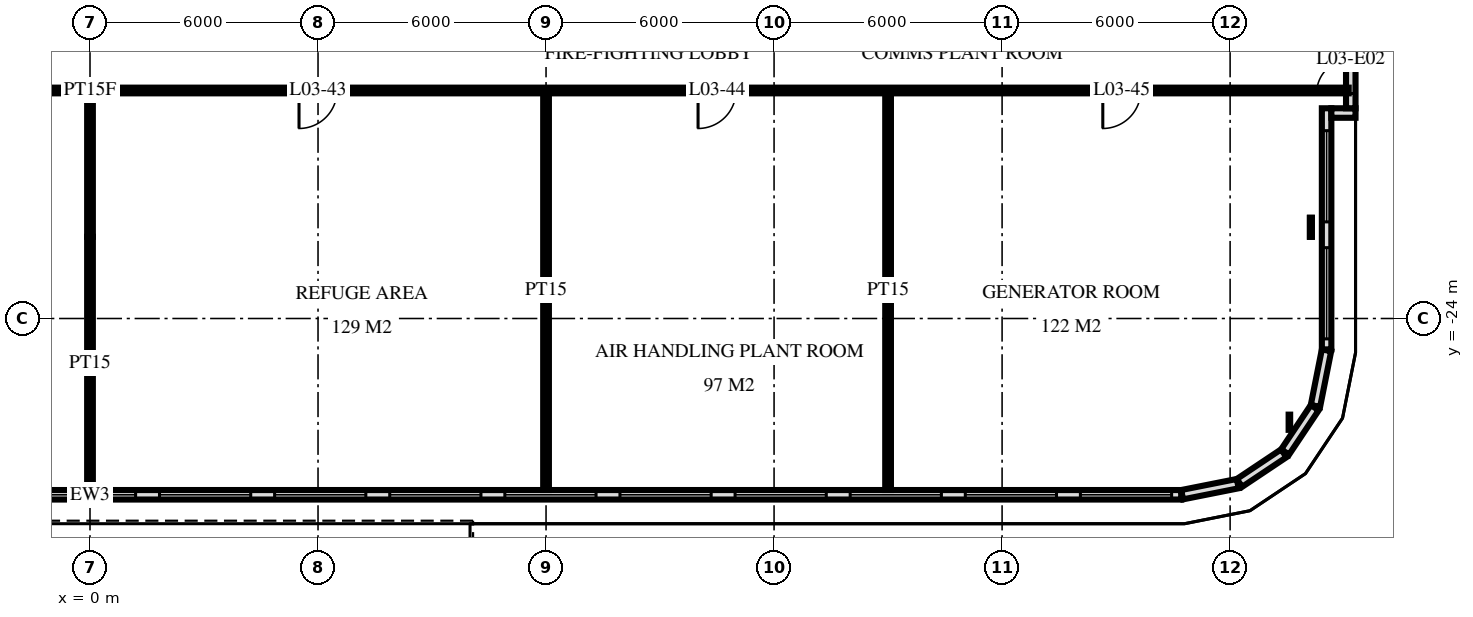
"""IFC4 building model, lengths in metres.
Left out: names, types, materials, properties, quantities, classifications, styles, units other than length and angle.
Written with IfcOpenShell. Run it as: python <this file> out.ifc"""

import sys

from ifc_helpers import new_model, si_unit, direction, frame, frame_2d, origin, place, context, subcontext, project, spatial, rectangle, extrude, element, fill, save


model = new_model("IFC4")
c1 = context("Model", 3, precision=1e-05, world=origin(), true_north=direction((0.0, 1.0)))
c2 = subcontext(c1, "Body", "Model", "MODEL_VIEW")
j1 = project(units=[si_unit("LENGTHUNIT", "METRE"), si_unit("PLANEANGLEUNIT", "RADIAN")], contexts=[c1])
p1 = place(None, origin())
s1 = spatial("IfcSite", under=j1, at=p1, CompositionType="ELEMENT")
p2 = place(p1, origin())
s2 = spatial("IfcBuilding", under=s1, at=p2, CompositionType="ELEMENT")
p3 = place(p2, frame((0.0, 0.0, 18.0)))
s3 = spatial("IfcBuildingStorey", under=s2, at=p3, CompositionType="ELEMENT", Elevation=18.0)
p4 = place(p3, frame((-28.713, -28.639, 0.0), z_axis=(0.0, 0.0, 1.0), x_axis=(1.0, 0.0, 0.0)))
e1 = element("IfcWall", 1, at=p4, inside=s3, PredefinedType="SOLIDWALL", context=c2, shape_type="SweptSolid", body=[
    extrude(rectangle(XDim=57.426, YDim=0.25, at=frame_2d((28.713, 0.0))), origin(), (0.0, 0.0, 1.0), 5.72),
])
p5 = place(p4, frame((0.252, 0.0, 0.858)))
e2 = element("IfcOpeningElement", 2, at=p5, cuts=e1, PredefinedType="OPENING", context=c2, shape_type="SweptSolid", body=[
    extrude(rectangle(XDim=2.4, YDim=3.6, at=frame_2d((1.2, 1.8))), frame((0.0, 0.135, 0.0), z_axis=(0.0, -1.0, 0.0), x_axis=(1.0, 0.0, 0.0)), (0.0, 0.0, 1.0), 0.27),
])
p6 = place(p4, frame((3.281, 0.0, 0.858)))
e3 = element("IfcOpeningElement", 3, at=p6, cuts=e1, PredefinedType="OPENING", context=c2, shape_type="SweptSolid", body=[
    extrude(rectangle(XDim=2.4, YDim=3.6, at=frame_2d((1.2, 1.8))), frame((0.0, 0.135, 0.0), z_axis=(0.0, -1.0, 0.0), x_axis=(1.0, 0.0, 0.0)), (0.0, 0.0, 1.0), 0.27),
])
p7 = place(p4, frame((6.31, 0.0, 0.858)))
e4 = element("IfcOpeningElement", 4, at=p7, cuts=e1, PredefinedType="OPENING", context=c2, shape_type="SweptSolid", body=[
    extrude(rectangle(XDim=2.4, YDim=3.6, at=frame_2d((1.2, 1.8))), frame((0.0, 0.135, 0.0), z_axis=(0.0, -1.0, 0.0), x_axis=(1.0, 0.0, 0.0)), (0.0, 0.0, 1.0), 0.27),
])
p8 = place(p4, frame((9.339, 0.0, 0.858)))
e5 = element("IfcOpeningElement", 5, at=p8, cuts=e1, PredefinedType="OPENING", context=c2, shape_type="SweptSolid", body=[
    extrude(rectangle(XDim=2.4, YDim=3.6, at=frame_2d((1.2, 1.8))), frame((0.0, 0.135, 0.0), z_axis=(0.0, -1.0, 0.0), x_axis=(1.0, 0.0, 0.0)), (0.0, 0.0, 1.0), 0.27),
])
p9 = place(p4, frame((12.368, 0.0, 0.858)))
e6 = element("IfcOpeningElement", 6, at=p9, cuts=e1, PredefinedType="OPENING", context=c2, shape_type="SweptSolid", body=[
    extrude(rectangle(XDim=2.4, YDim=3.6, at=frame_2d((1.2, 1.8))), frame((0.0, 0.135, 0.0), z_axis=(0.0, -1.0, 0.0), x_axis=(1.0, 0.0, 0.0)), (0.0, 0.0, 1.0), 0.27),
])
p10 = place(p4, frame((15.397, 0.0, 0.858)))
e7 = element("IfcOpeningElement", 7, at=p10, cuts=e1, PredefinedType="OPENING", context=c2, shape_type="SweptSolid", body=[
    extrude(rectangle(XDim=2.4, YDim=3.6, at=frame_2d((1.2, 1.8))), frame((0.0, 0.135, 0.0), z_axis=(0.0, -1.0, 0.0), x_axis=(1.0, 0.0, 0.0)), (0.0, 0.0, 1.0), 0.27),
])
p11 = place(p4, frame((18.426, 0.0, 0.858)))
e8 = element("IfcOpeningElement", 8, at=p11, cuts=e1, PredefinedType="OPENING", context=c2, shape_type="SweptSolid", body=[
    extrude(rectangle(XDim=2.4, YDim=3.6, at=frame_2d((1.2, 1.8))), frame((0.0, 0.135, 0.0), z_axis=(0.0, -1.0, 0.0), x_axis=(1.0, 0.0, 0.0)), (0.0, 0.0, 1.0), 0.27),
])
p12 = place(p4, frame((21.455, 0.0, 0.858)))
e9 = element("IfcOpeningElement", 9, at=p12, cuts=e1, PredefinedType="OPENING", context=c2, shape_type="SweptSolid", body=[
    extrude(rectangle(XDim=2.4, YDim=3.6, at=frame_2d((1.2, 1.8))), frame((0.0, 0.135, 0.0), z_axis=(0.0, -1.0, 0.0), x_axis=(1.0, 0.0, 0.0)), (0.0, 0.0, 1.0), 0.27),
])
p13 = place(p4, frame((24.484, 0.0, 0.858)))
e10 = element("IfcOpeningElement", 10, at=p13, cuts=e1, PredefinedType="OPENING", context=c2, shape_type="SweptSolid", body=[
    extrude(rectangle(XDim=2.4, YDim=3.6, at=frame_2d((1.2, 1.8))), frame((0.0, 0.135, 0.0), z_axis=(0.0, -1.0, 0.0), x_axis=(1.0, 0.0, 0.0)), (0.0, 0.0, 1.0), 0.27),
])
p14 = place(p4, frame((27.513, 0.0, 0.858)))
e11 = element("IfcOpeningElement", 11, at=p14, cuts=e1, PredefinedType="OPENING", context=c2, shape_type="SweptSolid", body=[
    extrude(rectangle(XDim=2.4, YDim=3.6, at=frame_2d((1.2, 1.8))), frame((0.0, 0.135, 0.0), z_axis=(0.0, -1.0, 0.0), x_axis=(1.0, 0.0, 0.0)), (0.0, 0.0, 1.0), 0.27),
])
p15 = place(p4, frame((30.542, 0.0, 0.858)))
e12 = element("IfcOpeningElement", 12, at=p15, cuts=e1, PredefinedType="OPENING", context=c2, shape_type="SweptSolid", body=[
    extrude(rectangle(XDim=2.4, YDim=3.6, at=frame_2d((1.2, 1.8))), frame((0.0, 0.135, 0.0), z_axis=(0.0, -1.0, 0.0), x_axis=(1.0, 0.0, 0.0)), (0.0, 0.0, 1.0), 0.27),
])
p16 = place(p4, frame((33.571, 0.0, 0.858)))
e13 = element("IfcOpeningElement", 13, at=p16, cuts=e1, PredefinedType="OPENING", context=c2, shape_type="SweptSolid", body=[
    extrude(rectangle(XDim=2.4, YDim=3.6, at=frame_2d((1.2, 1.8))), frame((0.0, 0.135, 0.0), z_axis=(0.0, -1.0, 0.0), x_axis=(1.0, 0.0, 0.0)), (0.0, 0.0, 1.0), 0.27),
])
p17 = place(p4, frame((36.6, 0.0, 0.858)))
e14 = element("IfcOpeningElement", 14, at=p17, cuts=e1, PredefinedType="OPENING", context=c2, shape_type="SweptSolid", body=[
    extrude(rectangle(XDim=2.4, YDim=3.6, at=frame_2d((1.2, 1.8))), frame((0.0, 0.135, 0.0), z_axis=(0.0, -1.0, 0.0), x_axis=(1.0, 0.0, 0.0)), (0.0, 0.0, 1.0), 0.27),
])
p18 = place(p4, frame((39.629, 0.0, 0.858)))
e15 = element("IfcOpeningElement", 15, at=p18, cuts=e1, PredefinedType="OPENING", context=c2, shape_type="SweptSolid", body=[
    extrude(rectangle(XDim=2.4, YDim=3.6, at=frame_2d((1.2, 1.8))), frame((0.0, 0.135, 0.0), z_axis=(0.0, -1.0, 0.0), x_axis=(1.0, 0.0, 0.0)), (0.0, 0.0, 1.0), 0.27),
])
p19 = place(p4, frame((42.658, 0.0, 0.858)))
e16 = element("IfcOpeningElement", 16, at=p19, cuts=e1, PredefinedType="OPENING", context=c2, shape_type="SweptSolid", body=[
    extrude(rectangle(XDim=2.4, YDim=3.6, at=frame_2d((1.2, 1.8))), frame((0.0, 0.135, 0.0), z_axis=(0.0, -1.0, 0.0), x_axis=(1.0, 0.0, 0.0)), (0.0, 0.0, 1.0), 0.27),
])
p20 = place(p4, frame((45.687, 0.0, 0.858)))
e17 = element("IfcOpeningElement", 17, at=p20, cuts=e1, PredefinedType="OPENING", context=c2, shape_type="SweptSolid", body=[
    extrude(rectangle(XDim=2.4, YDim=3.6, at=frame_2d((1.2, 1.8))), frame((0.0, 0.135, 0.0), z_axis=(0.0, -1.0, 0.0), x_axis=(1.0, 0.0, 0.0)), (0.0, 0.0, 1.0), 0.27),
])
p21 = place(p4, frame((48.716, 0.0, 0.858)))
e18 = element("IfcOpeningElement", 18, at=p21, cuts=e1, PredefinedType="OPENING", context=c2, shape_type="SweptSolid", body=[
    extrude(rectangle(XDim=2.4, YDim=3.6, at=frame_2d((1.2, 1.8))), frame((0.0, 0.135, 0.0), z_axis=(0.0, -1.0, 0.0), x_axis=(1.0, 0.0, 0.0)), (0.0, 0.0, 1.0), 0.27),
])
p22 = place(p4, frame((51.745, 0.0, 0.858)))
e19 = element("IfcOpeningElement", 19, at=p22, cuts=e1, PredefinedType="OPENING", context=c2, shape_type="SweptSolid", body=[
    extrude(rectangle(XDim=2.4, YDim=3.6, at=frame_2d((1.2, 1.8))), frame((0.0, 0.135, 0.0), z_axis=(0.0, -1.0, 0.0), x_axis=(1.0, 0.0, 0.0)), (0.0, 0.0, 1.0), 0.27),
])
p23 = place(p4, frame((54.774, 0.0, 0.858)))
e20 = element("IfcOpeningElement", 20, at=p23, cuts=e1, PredefinedType="OPENING", context=c2, shape_type="SweptSolid", body=[
    extrude(rectangle(XDim=2.4, YDim=3.6, at=frame_2d((1.2, 1.8))), frame((0.0, 0.135, 0.0), z_axis=(0.0, -1.0, 0.0), x_axis=(1.0, 0.0, 0.0)), (0.0, 0.0, 1.0), 0.27),
])
p24 = place(p3, frame((28.737, -28.637, 0.0), z_axis=(0.0, 0.0, 1.0), x_axis=(0.980768988185, 0.19517221066, 0.0)))
e21 = element("IfcWall", 21, at=p24, inside=s3, PredefinedType="SOLIDWALL", context=c2, shape_type="SweptSolid", body=[
    extrude(rectangle(XDim=1.492, YDim=0.25, at=frame_2d((0.746, 0.0))), origin(), (0.0, 0.0, 1.0), 4.72),
])
for number, where, z_axis, x_axis in (
    (22, (30.246, -28.327, 0.0), (0.0, 0.0, 1.0), (0.831, 0.556, 0.0)),
    (23, (31.447, -27.513, 0.0), (0.0, 0.0, 1.0), (0.556, 0.831, 0.0)),
):
    element("IfcWall", number, at=place(p3, frame(where, z_axis=z_axis, x_axis=x_axis)), inside=s3, PredefinedType="SOLIDWALL", context=c2, shape_type="SweptSolid", body=[
        extrude(rectangle(XDim=1.403, YDim=0.25, at=frame_2d((0.702, 0.0))), origin(), (0.0, 0.0, 1.0), 5.72),
    ])
p25 = place(p3, frame((32.246, -26.301, 0.0), z_axis=(0.0, 0.0, 1.0), x_axis=(0.195014837095, 0.980800292268, 0.0)))
e24 = element("IfcWall", 24, at=p25, inside=s3, PredefinedType="SOLIDWALL", context=c2, shape_type="SweptSolid", body=[
    extrude(rectangle(XDim=1.492, YDim=0.25, at=frame_2d((0.746, 0.0))), origin(), (0.0, 0.0, 1.0), 4.52),
])
p26 = place(p3, frame((32.539, -24.813, 0.0), z_axis=(0.0, 0.0, 1.0), x_axis=(0.0, 1.0, 0.0)))
e25 = element("IfcWall", 25, at=p26, inside=s3, PredefinedType="SOLIDWALL", context=c2, shape_type="SweptSolid", body=[
    extrude(rectangle(XDim=6.345, YDim=0.25, at=frame_2d((3.172, 0.0))), origin(), (0.0, 0.0, 1.0), 5.72),
])
p27 = place(p26, frame((0.277, 0.0, 1.005)))
e26 = element("IfcOpeningElement", 26, at=p27, cuts=e25, PredefinedType="OPENING", context=c2, shape_type="SweptSolid", body=[
    extrude(rectangle(XDim=2.4, YDim=3.6, at=frame_2d((1.2, 1.8))), frame((0.0, 0.135, 0.0), z_axis=(0.0, -1.0, 0.0), x_axis=(1.0, 0.0, 0.0)), (0.0, 0.0, 1.0), 0.27),
])
p28 = place(p26, frame((3.355, 0.0, 1.005)))
e27 = element("IfcOpeningElement", 27, at=p28, cuts=e25, PredefinedType="OPENING", context=c2, shape_type="SweptSolid", body=[
    extrude(rectangle(XDim=2.4, YDim=3.6, at=frame_2d((1.2, 1.8))), frame((0.0, 0.135, 0.0), z_axis=(0.0, -1.0, 0.0), x_axis=(1.0, 0.0, 0.0)), (0.0, 0.0, 1.0), 0.27),
])
p29 = place(p3, frame((32.664, -18.593, 0.0), z_axis=(0.0, 0.0, 1.0), x_axis=(1.0, 0.0, 0.0)))
e28 = element("IfcWall", 28, at=p29, inside=s3, PredefinedType="SOLIDWALL", context=c2, shape_type="SweptSolid", body=[
    extrude(rectangle(XDim=0.636, YDim=0.25, at=frame_2d((0.318, 0.0))), origin(), (0.0, 0.0, 1.0), 5.72),
])
p30 = place(p3, frame((33.175, -18.468, 0.0), z_axis=(0.0, 0.0, 1.0), x_axis=(0.0, 1.0, 0.0)))
e29 = element("IfcWall", 29, at=p30, inside=s3, PredefinedType="SOLIDWALL", context=c2, shape_type="SweptSolid", body=[
    extrude(rectangle(XDim=2.829, YDim=0.25, at=frame_2d((1.414, 0.0))), origin(), (0.0, 0.0, 1.0), 5.72),
])
p31 = place(p30, frame((0.389, 0.0, 0.0)))
e30 = element("IfcOpeningElement", 30, at=p31, cuts=e29, PredefinedType="OPENING", context=c2, shape_type="SweptSolid", body=[
    extrude(rectangle(XDim=1.8, YDim=2.4, at=frame_2d((0.9, 1.2))), frame((0.0, 0.135, 0.0), z_axis=(0.0, -1.0, 0.0), x_axis=(1.0, 0.0, 0.0)), (0.0, 0.0, 1.0), 0.27),
])
p32 = place(p3, frame((21.0, -28.512, 0.0), z_axis=(0.0, 0.0, 1.0), x_axis=(0.0, 1.0, 0.0)))
e31 = element("IfcWall", 31, at=p32, inside=s3, PredefinedType="PARTITIONING", context=c2, shape_type="SweptSolid", body=[
    extrude(rectangle(XDim=10.512, YDim=0.15, at=frame_2d((5.256, 0.0))), origin(), (0.0, 0.0, 1.0), 5.55),
])
p33 = place(p3, frame((12.0, -28.512, 0.0), z_axis=(0.0, 0.0, 1.0), x_axis=(0.0, 1.0, 0.0)))
e32 = element("IfcWall", 32, at=p33, inside=s3, PredefinedType="PARTITIONING", context=c2, shape_type="SweptSolid", body=[
    extrude(rectangle(XDim=10.512, YDim=0.15, at=frame_2d((5.256, 0.0))), origin(), (0.0, 0.0, 1.0), 4.52),
])
p34 = place(p3, frame((0.0, -28.512, 0.0), z_axis=(0.0, 0.0, 1.0), x_axis=(0.0, 1.0, 0.0)))
e33 = element("IfcWall", 33, at=p34, inside=s3, PredefinedType="PARTITIONING", context=c2, shape_type="SweptSolid", body=[
    extrude(rectangle(XDim=6.662, YDim=0.15, at=frame_2d((3.331, 0.0))), origin(), (0.0, 0.0, 1.0), 4.52),
])
p35 = place(p3, frame((-33.12, -18.0, 0.0), z_axis=(0.0, 0.0, 1.0), x_axis=(1.0, 0.0, 0.0)))
e34 = element("IfcWall", 34, at=p35, inside=s3, PredefinedType="PARTITIONING", context=c2, shape_type="SweptSolid", body=[
    extrude(rectangle(XDim=66.24, YDim=0.15, at=frame_2d((33.12, 0.0))), origin(), (0.0, 0.0, 1.0), 5.55),
])
p36 = place(p35, frame((6.97, 0.0, 0.0)))
e35 = element("IfcOpeningElement", 35, at=p36, cuts=e34, PredefinedType="OPENING", context=c2, shape_type="SweptSolid", body=[
    extrude(rectangle(XDim=1.0, YDim=2.1, at=frame_2d((0.5, 1.05))), frame((0.0, 0.085, 0.0), z_axis=(0.0, -1.0, 0.0), x_axis=(1.0, 0.0, 0.0)), (0.0, 0.0, 1.0), 0.17),
])
p37 = place(p35, frame((19.12, 0.0, 0.0)))
e36 = element("IfcOpeningElement", 36, at=p37, cuts=e34, PredefinedType="OPENING", context=c2, shape_type="SweptSolid", body=[
    extrude(rectangle(XDim=1.0, YDim=2.1, at=frame_2d((0.5, 1.05))), frame((0.0, 0.085, 0.0), z_axis=(0.0, -1.0, 0.0), x_axis=(1.0, 0.0, 0.0)), (0.0, 0.0, 1.0), 0.17),
])
p38 = place(p35, frame((28.12, 0.0, 0.0)))
e37 = element("IfcOpeningElement", 37, at=p38, cuts=e34, PredefinedType="OPENING", context=c2, shape_type="SweptSolid", body=[
    extrude(rectangle(XDim=1.0, YDim=2.1, at=frame_2d((0.5, 1.05))), frame((0.0, 0.085, 0.0), z_axis=(0.0, -1.0, 0.0), x_axis=(1.0, 0.0, 0.0)), (0.0, 0.0, 1.0), 0.17),
])
p39 = place(p35, frame((38.62, 0.0, 0.0)))
e38 = element("IfcOpeningElement", 38, at=p39, cuts=e34, PredefinedType="OPENING", context=c2, shape_type="SweptSolid", body=[
    extrude(rectangle(XDim=1.0, YDim=2.1, at=frame_2d((0.5, 1.05))), frame((0.0, 0.085, 0.0), z_axis=(0.0, -1.0, 0.0), x_axis=(1.0, 0.0, 0.0)), (0.0, 0.0, 1.0), 0.17),
])
p40 = place(p35, frame((49.12, 0.0, 0.0)))
e39 = element("IfcOpeningElement", 39, at=p40, cuts=e34, PredefinedType="OPENING", context=c2, shape_type="SweptSolid", body=[
    extrude(rectangle(XDim=1.0, YDim=2.1, at=frame_2d((0.5, 1.05))), frame((0.0, 0.085, 0.0), z_axis=(0.0, -1.0, 0.0), x_axis=(1.0, 0.0, 0.0)), (0.0, 0.0, 1.0), 0.17),
])
p41 = place(p35, frame((59.77, 0.0, 0.0)))
e40 = element("IfcOpeningElement", 40, at=p41, cuts=e34, PredefinedType="OPENING", context=c2, shape_type="SweptSolid", body=[
    extrude(rectangle(XDim=1.0, YDim=2.1, at=frame_2d((0.5, 1.05))), frame((0.0, 0.085, 0.0), z_axis=(0.0, -1.0, 0.0), x_axis=(1.0, 0.0, 0.0)), (0.0, 0.0, 1.0), 0.17),
])
p42 = place(p3, frame((0.0, -21.85, 0.0), z_axis=(0.0, 0.0, 1.0), x_axis=(0.0, 1.0, 0.0)))
e41 = element("IfcWall", 41, at=p42, inside=s3, PredefinedType="PARTITIONING", context=c2, shape_type="SweptSolid", body=[
    extrude(rectangle(XDim=3.85, YDim=0.15, at=frame_2d((1.925, 0.0))), origin(), (0.0, 0.0, 1.0), 5.55),
])
p43 = place(p14, origin())
e42 = element("IfcWindow", 42, at=p43, inside=s3, PartitioningType="SINGLE_PANEL", PredefinedType="USERDEFINED", context=c2, shape_type="SweptSolid", body=[
    extrude(rectangle(XDim=2.4, YDim=3.6, at=frame_2d((1.2, 1.8))), frame((0.0, 0.125, 0.0), z_axis=(0.0, -1.0, 0.0), x_axis=(1.0, 0.0, 0.0)), (0.0, 0.0, 1.0), 0.06),
])
fill(e11, e42)
p44 = place(p15, origin())
e43 = element("IfcWindow", 43, at=p44, inside=s3, PartitioningType="SINGLE_PANEL", PredefinedType="USERDEFINED", context=c2, shape_type="SweptSolid", body=[
    extrude(rectangle(XDim=2.4, YDim=3.6, at=frame_2d((1.2, 1.8))), frame((0.0, 0.125, 0.0), z_axis=(0.0, -1.0, 0.0), x_axis=(1.0, 0.0, 0.0)), (0.0, 0.0, 1.0), 0.06),
])
fill(e12, e43)
p45 = place(p16, origin())
e44 = element("IfcWindow", 44, at=p45, inside=s3, PartitioningType="SINGLE_PANEL", PredefinedType="USERDEFINED", context=c2, shape_type="SweptSolid", body=[
    extrude(rectangle(XDim=2.4, YDim=3.6, at=frame_2d((1.2, 1.8))), frame((0.0, 0.125, 0.0), z_axis=(0.0, -1.0, 0.0), x_axis=(1.0, 0.0, 0.0)), (0.0, 0.0, 1.0), 0.06),
])
fill(e13, e44)
p46 = place(p17, origin())
e45 = element("IfcWindow", 45, at=p46, inside=s3, PartitioningType="SINGLE_PANEL", PredefinedType="USERDEFINED", context=c2, shape_type="SweptSolid", body=[
    extrude(rectangle(XDim=2.4, YDim=3.6, at=frame_2d((1.2, 1.8))), frame((0.0, 0.125, 0.0), z_axis=(0.0, -1.0, 0.0), x_axis=(1.0, 0.0, 0.0)), (0.0, 0.0, 1.0), 0.06),
])
fill(e14, e45)
p47 = place(p18, origin())
e46 = element("IfcWindow", 46, at=p47, inside=s3, PartitioningType="SINGLE_PANEL", PredefinedType="USERDEFINED", context=c2, shape_type="SweptSolid", body=[
    extrude(rectangle(XDim=2.4, YDim=3.6, at=frame_2d((1.2, 1.8))), frame((0.0, 0.125, 0.0), z_axis=(0.0, -1.0, 0.0), x_axis=(1.0, 0.0, 0.0)), (0.0, 0.0, 1.0), 0.06),
])
fill(e15, e46)
p48 = place(p19, origin())
e47 = element("IfcWindow", 47, at=p48, inside=s3, PartitioningType="SINGLE_PANEL", PredefinedType="USERDEFINED", context=c2, shape_type="SweptSolid", body=[
    extrude(rectangle(XDim=2.4, YDim=3.6, at=frame_2d((1.2, 1.8))), frame((0.0, 0.125, 0.0), z_axis=(0.0, -1.0, 0.0), x_axis=(1.0, 0.0, 0.0)), (0.0, 0.0, 1.0), 0.06),
])
fill(e16, e47)
p49 = place(p20, origin())
e48 = element("IfcWindow", 48, at=p49, inside=s3, PartitioningType="SINGLE_PANEL", PredefinedType="USERDEFINED", context=c2, shape_type="SweptSolid", body=[
    extrude(rectangle(XDim=2.4, YDim=3.6, at=frame_2d((1.2, 1.8))), frame((0.0, 0.125, 0.0), z_axis=(0.0, -1.0, 0.0), x_axis=(1.0, 0.0, 0.0)), (0.0, 0.0, 1.0), 0.06),
])
fill(e17, e48)
p50 = place(p21, origin())
e49 = element("IfcWindow", 49, at=p50, inside=s3, PartitioningType="SINGLE_PANEL", PredefinedType="USERDEFINED", context=c2, shape_type="SweptSolid", body=[
    extrude(rectangle(XDim=2.4, YDim=3.6, at=frame_2d((1.2, 1.8))), frame((0.0, 0.125, 0.0), z_axis=(0.0, -1.0, 0.0), x_axis=(1.0, 0.0, 0.0)), (0.0, 0.0, 1.0), 0.06),
])
fill(e18, e49)
p51 = place(p22, origin())
e50 = element("IfcWindow", 50, at=p51, inside=s3, PartitioningType="SINGLE_PANEL", PredefinedType="USERDEFINED", context=c2, shape_type="SweptSolid", body=[
    extrude(rectangle(XDim=2.4, YDim=3.6, at=frame_2d((1.2, 1.8))), frame((0.0, 0.125, 0.0), z_axis=(0.0, -1.0, 0.0), x_axis=(1.0, 0.0, 0.0)), (0.0, 0.0, 1.0), 0.06),
])
fill(e19, e50)
p52 = place(p23, origin())
e51 = element("IfcWindow", 51, at=p52, inside=s3, PartitioningType="SINGLE_PANEL", PredefinedType="USERDEFINED", context=c2, shape_type="SweptSolid", body=[
    extrude(rectangle(XDim=2.4, YDim=3.6, at=frame_2d((1.2, 1.8))), frame((0.0, 0.125, 0.0), z_axis=(0.0, -1.0, 0.0), x_axis=(1.0, 0.0, 0.0)), (0.0, 0.0, 1.0), 0.06),
])
fill(e20, e51)
p53 = place(p27, origin())
e52 = element("IfcWindow", 52, at=p53, inside=s3, PartitioningType="SINGLE_PANEL", PredefinedType="USERDEFINED", context=c2, shape_type="SweptSolid", body=[
    extrude(rectangle(XDim=2.4, YDim=3.6, at=frame_2d((1.2, 1.8))), frame((0.0, 0.125, 0.0), z_axis=(0.0, -1.0, 0.0), x_axis=(1.0, 0.0, 0.0)), (0.0, 0.0, 1.0), 0.06),
])
fill(e26, e52)
p54 = place(p28, origin())
e53 = element("IfcWindow", 53, at=p54, inside=s3, PartitioningType="SINGLE_PANEL", PredefinedType="USERDEFINED", context=c2, shape_type="SweptSolid", body=[
    extrude(rectangle(XDim=2.4, YDim=3.6, at=frame_2d((1.2, 1.8))), frame((0.0, 0.125, 0.0), z_axis=(0.0, -1.0, 0.0), x_axis=(1.0, 0.0, 0.0)), (0.0, 0.0, 1.0), 0.06),
])
fill(e27, e53)
p55 = place(p31, origin())
e54 = element("IfcDoor", 54, at=p55, inside=s3, OperationType="DOUBLE_DOOR_SINGLE_SWING", PredefinedType="DOOR", context=c2, shape_type="SweptSolid", body=[
    extrude(rectangle(XDim=1.8, YDim=2.4, at=frame_2d((0.9, 1.2))), frame((0.0, 0.025, 0.0), z_axis=(0.0, -1.0, 0.0), x_axis=(1.0, 0.0, 0.0)), (0.0, 0.0, 1.0), 0.05),
])
fill(e30, e54)
p56 = place(p39, frame((0.5, 0.0, 0.0), z_axis=(0.0, 0.0, 1.0), x_axis=(-1.0, 0.0, 0.0)))
e55 = element("IfcDoor", 55, at=p56, inside=s3, OperationType="SINGLE_SWING_LEFT", PredefinedType="DOOR", context=c2, shape_type="SweptSolid", body=[
    extrude(rectangle(XDim=1.0, YDim=2.1, at=frame_2d((0.0, 1.05))), frame((0.0, -0.025, 0.0), z_axis=(0.0, 1.0, 0.0), x_axis=(-1.0, 0.0, 0.0)), (0.0, 0.0, 1.0), 0.05),
])
fill(e38, e55)
p57 = place(p40, frame((0.5, 0.0, 0.0), z_axis=(0.0, 0.0, 1.0), x_axis=(-1.0, 0.0, 0.0)))
e56 = element("IfcDoor", 56, at=p57, inside=s3, OperationType="SINGLE_SWING_LEFT", PredefinedType="DOOR", context=c2, shape_type="SweptSolid", body=[
    extrude(rectangle(XDim=1.0, YDim=2.1, at=frame_2d((0.0, 1.05))), frame((0.0, -0.025, 0.0), z_axis=(0.0, 1.0, 0.0), x_axis=(-1.0, 0.0, 0.0)), (0.0, 0.0, 1.0), 0.05),
])
fill(e39, e56)
p58 = place(p41, frame((0.5, 0.0, 0.0), z_axis=(0.0, 0.0, 1.0), x_axis=(-1.0, 0.0, 0.0)))
e57 = element("IfcDoor", 57, at=p58, inside=s3, OperationType="SINGLE_SWING_LEFT", PredefinedType="DOOR", context=c2, shape_type="SweptSolid", body=[
    extrude(rectangle(XDim=1.0, YDim=2.1, at=frame_2d((0.0, 1.05))), frame((0.0, -0.025, 0.0), z_axis=(0.0, 1.0, 0.0), x_axis=(-1.0, 0.0, 0.0)), (0.0, 0.0, 1.0), 0.05),
])
fill(e40, e57)
save(model, sys.argv[1])
